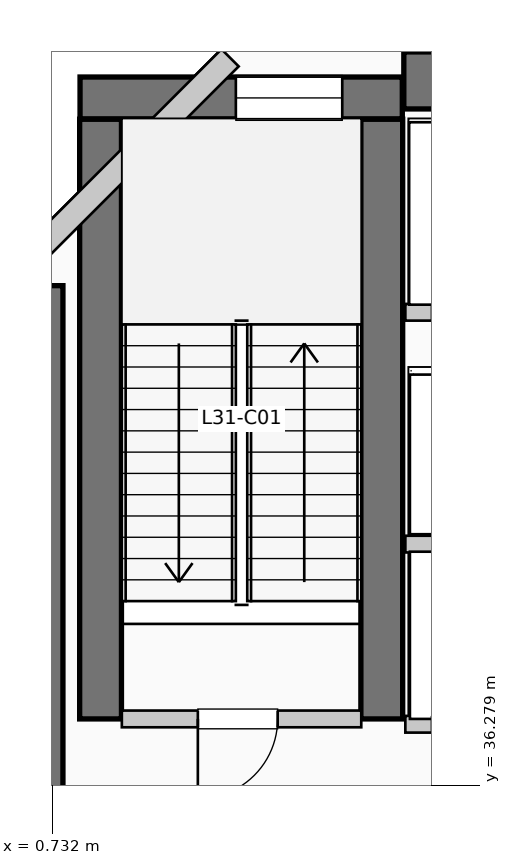
"""IFC4 building model, lengths in metres.
Left out: names, types, materials, properties, quantities, classifications, styles, units other than length and angle.
Written with IfcOpenShell. Run it as: python <this file> out.ifc"""

import sys

from ifc_helpers import new_model, si_unit, direction, frame, frame_2d, origin, place, context, subcontext, project, spatial, rectangle, extrude, element, fill, save


model = new_model("IFC4")
c1 = context("Model", 3, precision=1e-05, world=origin(), true_north=direction((0.0, 1.0)))
c2 = subcontext(c1, "Body", "Model", "MODEL_VIEW")
j1 = project(units=[si_unit("LENGTHUNIT", "METRE"), si_unit("PLANEANGLEUNIT", "RADIAN")], contexts=[c1])
p1 = place(None, origin())
s1 = spatial("IfcSite", under=j1, at=p1, CompositionType="ELEMENT")
p2 = place(p1, origin())
s2 = spatial("IfcBuilding", under=s1, at=p2, CompositionType="ELEMENT")
p3 = place(p2, frame((0.0, 0.0, 130.35)))
s3 = spatial("IfcBuildingStorey", under=s2, at=p3, CompositionType="ELEMENT", Elevation=130.35)
p4 = place(p3, frame((5.36, 45.55, 0.0), z_axis=(0.0, 0.0, 1.0), x_axis=(1.0, 0.0, 0.0)))
e1 = element("IfcWall", 1, at=p4, inside=s3, PredefinedType="SHEAR", context=c2, shape_type="SweptSolid", body=[
    extrude(rectangle(XDim=13.98, YDim=0.75, at=frame_2d((6.99, 0.0))), origin(), (0.0, 0.0, 1.0), 4.62),
])
p5 = place(p3, frame((0.5, 34.95, 0.0), z_axis=(0.0, 0.0, 1.0), x_axis=(0.0, 1.0, 0.0)))
e2 = element("IfcWall", 2, at=p5, inside=s3, PredefinedType="SHEAR", context=c2, shape_type="SweptSolid", body=[
    extrude(rectangle(XDim=7.9, YDim=0.75, at=frame_2d((3.95, 0.0))), origin(), (0.0, 0.0, 1.0), 4.62),
])
for number, where, z_axis, x_axis in (
    (3, (1.37, 37.15, 0.0), (0.0, 0.0, 1.0), (0.0, 1.0, 0.0)),
    (4, (5.07, 37.15, 0.0), (0.0, 0.0, 1.0), (0.0, 1.0, 0.0)),
):
    element("IfcWall", number, at=place(p3, frame(where, z_axis=z_axis, x_axis=x_axis)), inside=s3, PredefinedType="SHEAR", context=c2, shape_type="SweptSolid", body=[
        extrude(rectangle(XDim=7.89, YDim=0.55, at=frame_2d((3.945, 0.0))), origin(), (0.0, 0.0, 1.0), 4.62),
    ])
p6 = place(p3, frame((1.1, 45.32, 0.0), z_axis=(0.0, 0.0, 1.0), x_axis=(1.0, 0.0, 0.0)))
e5 = element("IfcWall", 5, at=p6, inside=s3, PredefinedType="SHEAR", context=c2, shape_type="SweptSolid", body=[
    extrude(rectangle(XDim=4.24, YDim=0.55, at=frame_2d((2.12, 0.0))), origin(), (0.0, 0.0, 1.0), 4.62),
])
p7 = place(p6, frame((2.05, 0.0, 1.05)))
e6 = element("IfcOpeningElement", 6, at=p7, cuts=e5, PredefinedType="OPENING", context=c2, shape_type="SweptSolid", body=[
    extrude(rectangle(XDim=1.4, YDim=1.8, at=frame_2d((0.7, 0.9))), frame((0.0, 0.285, 0.0), z_axis=(0.0, -1.0, 0.0), x_axis=(1.0, 0.0, 0.0)), (0.0, 0.0, 1.0), 0.57),
])
p8 = place(p3, frame((3.074, 45.848, 0.0), z_axis=(0.0, 0.0, 1.0), x_axis=(-0.707106781187, -0.707106781187, 0.0)))
e7 = element("IfcWall", 7, at=p8, inside=s3, PredefinedType="SOLIDWALL", context=c2, shape_type="SweptSolid", body=[
    extrude(rectangle(XDim=4.133, YDim=0.32, at=frame_2d((2.066, 0.0))), origin(), (0.0, 0.0, 1.0), 4.37),
])
p9 = place(p3, frame((1.65, 37.15, 0.0), z_axis=(0.0, 0.0, 1.0), x_axis=(1.0, 0.0, 0.0)))
e8 = element("IfcWall", 8, at=p9, inside=s3, PredefinedType="PARTITIONING", context=c2, shape_type="SweptSolid", body=[
    extrude(rectangle(XDim=3.15, YDim=0.22, at=frame_2d((1.575, 0.0))), origin(), (0.0, 0.0, 1.0), 4.37),
])
p10 = place(p9, frame((2.05, 0.0, 0.0), z_axis=(0.0, 0.0, 1.0), x_axis=(-1.0, 0.0, 0.0)))
e9 = element("IfcOpeningElement", 9, at=p10, cuts=e8, PredefinedType="OPENING", context=c2, shape_type="SweptSolid", body=[
    extrude(rectangle(XDim=1.05, YDim=2.15, at=frame_2d((0.525, 1.075))), frame((0.0, 0.12, 0.0), z_axis=(0.0, -1.0, 0.0), x_axis=(1.0, 0.0, 0.0)), (0.0, 0.0, 1.0), 0.24),
])
p11 = place(p3, frame((5.38, 37.08, 0.0), z_axis=(0.0, 0.0, 1.0), x_axis=(1.0, 0.0, 0.0)))
e10 = element("IfcWall", 10, at=p11, inside=s3, PredefinedType="PARTITIONING", context=c2, shape_type="SweptSolid", body=[
    extrude(rectangle(XDim=3.46, YDim=0.22, at=frame_2d((1.73, 0.0))), origin(), (0.0, 0.0, 1.0), 4.37),
])
p12 = place(p11, frame((1.55, 0.0, 0.0), z_axis=(0.0, 0.0, 1.0), x_axis=(-1.0, 0.0, 0.0)))
e11 = element("IfcOpeningElement", 11, at=p12, cuts=e10, PredefinedType="OPENING", context=c2, shape_type="SweptSolid", body=[
    extrude(rectangle(XDim=1.2, YDim=2.2, at=frame_2d((0.6, 1.1))), frame((0.0, 0.12, 0.0), z_axis=(0.0, -1.0, 0.0), x_axis=(1.0, 0.0, 0.0)), (0.0, 0.0, 1.0), 0.24),
])
p13 = place(p11, frame((3.22, 0.0, 0.0), z_axis=(0.0, 0.0, 1.0), x_axis=(-1.0, 0.0, 0.0)))
e12 = element("IfcOpeningElement", 12, at=p13, cuts=e10, PredefinedType="OPENING", context=c2, shape_type="SweptSolid", body=[
    extrude(rectangle(XDim=1.2, YDim=2.2, at=frame_2d((0.6, 1.1))), frame((0.0, 0.12, 0.0), z_axis=(0.0, -1.0, 0.0), x_axis=(1.0, 0.0, 0.0)), (0.0, 0.0, 1.0), 0.24),
])
p14 = place(p3, frame((5.38, 39.45, 0.0), z_axis=(0.0, 0.0, 1.0), x_axis=(1.0, 0.0, 0.0)))
e13 = element("IfcWall", 13, at=p14, inside=s3, PredefinedType="PARTITIONING", context=c2, shape_type="SweptSolid", body=[
    extrude(rectangle(XDim=3.46, YDim=0.22, at=frame_2d((1.73, 0.0))), origin(), (0.0, 0.0, 1.0), 4.37),
])
p15 = place(p3, frame((5.38, 42.5, 0.0), z_axis=(0.0, 0.0, 1.0), x_axis=(1.0, 0.0, 0.0)))
e14 = element("IfcWall", 14, at=p15, inside=s3, PredefinedType="PARTITIONING", context=c2, shape_type="SweptSolid", body=[
    extrude(rectangle(XDim=3.77, YDim=0.22, at=frame_2d((1.885, 0.0))), origin(), (0.0, 0.0, 1.0), 4.37),
])
p16 = place(p15, frame((1.75, 0.0, 0.0), z_axis=(0.0, 0.0, 1.0), x_axis=(-1.0, 0.0, 0.0)))
e15 = element("IfcOpeningElement", 15, at=p16, cuts=e14, PredefinedType="OPENING", context=c2, shape_type="SweptSolid", body=[
    extrude(rectangle(XDim=1.4, YDim=2.2, at=frame_2d((0.7, 1.1))), frame((0.0, 0.12, 0.0), z_axis=(0.0, -1.0, 0.0), x_axis=(1.0, 0.0, 0.0)), (0.0, 0.0, 1.0), 0.24),
])
p17 = place(p15, frame((3.53, 0.0, 0.0), z_axis=(0.0, 0.0, 1.0), x_axis=(-1.0, 0.0, 0.0)))
e16 = element("IfcOpeningElement", 16, at=p17, cuts=e14, PredefinedType="OPENING", context=c2, shape_type="SweptSolid", body=[
    extrude(rectangle(XDim=1.4, YDim=2.2, at=frame_2d((0.7, 1.1))), frame((0.0, 0.12, 0.0), z_axis=(0.0, -1.0, 0.0), x_axis=(1.0, 0.0, 0.0)), (0.0, 0.0, 1.0), 0.24),
])
p18 = place(p7, origin())
e17 = element("IfcWindow", 17, at=p18, inside=s3, PartitioningType="SINGLE_PANEL", PredefinedType="WINDOW", context=c2, shape_type="SweptSolid", body=[
    extrude(rectangle(XDim=1.4, YDim=1.8, at=frame_2d((0.7, 0.9))), frame((0.0, 0.03, 0.0), z_axis=(0.0, -1.0, 0.0), x_axis=(1.0, 0.0, 0.0)), (0.0, 0.0, 1.0), 0.06),
])
fill(e6, e17)
p19 = place(p10, origin())
e18 = element("IfcDoor", 18, at=p19, inside=s3, OperationType="SINGLE_SWING_LEFT", PredefinedType="DOOR", context=c2, shape_type="SweptSolid", body=[
    extrude(rectangle(XDim=1.05, YDim=2.15, at=frame_2d((0.525, 1.075))), frame((0.0, 0.025, 0.0), z_axis=(0.0, -1.0, 0.0), x_axis=(1.0, 0.0, 0.0)), (0.0, 0.0, 1.0), 0.05),
])
fill(e9, e18)
save(model, sys.argv[1])
